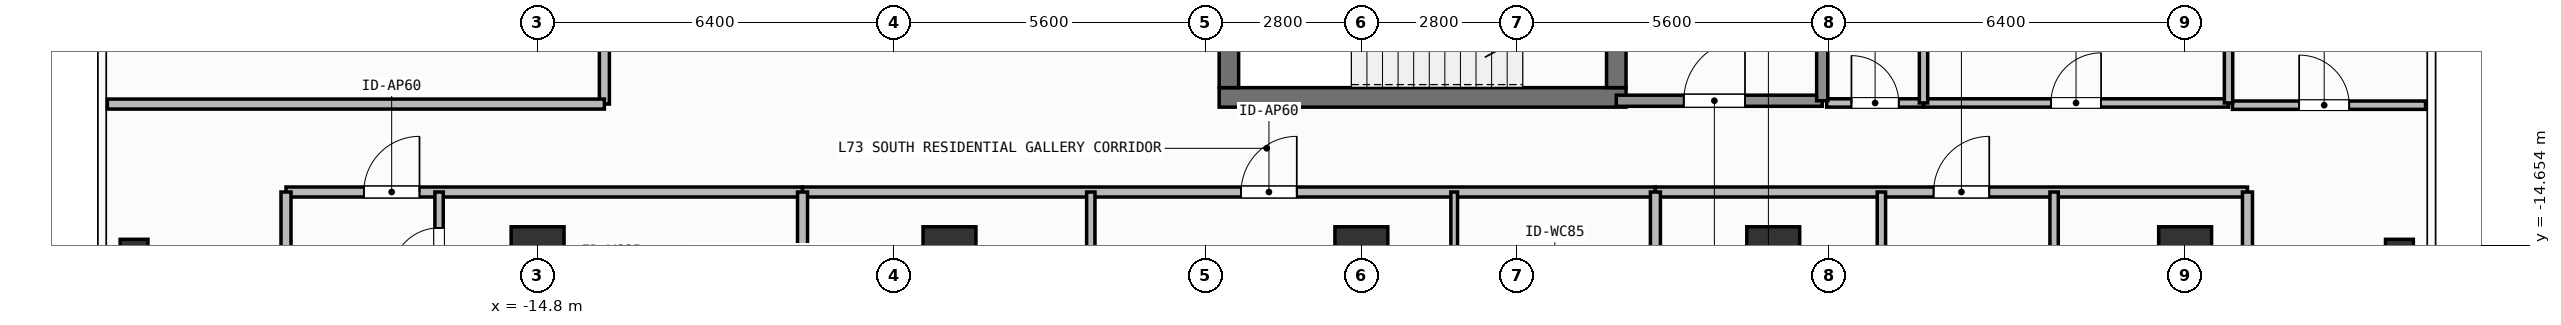
"""IFC4 building model, lengths in metres.
Left out: names, types, materials, properties, quantities, classifications, styles, units other than length and angle.
Written with IfcOpenShell. Run it as: python <this file> out.ifc"""

import sys

from ifc_helpers import new_model, si_unit, direction, frame, frame_2d, origin, origin_2d, place, context, subcontext, project, spatial, rectangle, hollow_rectangle, extrude, element, fill, save


model = new_model("IFC4")
c1 = context("Model", 3, precision=1e-05, world=origin(), true_north=direction((0.0, 1.0)))
c2 = subcontext(c1, "Body", "Model", "MODEL_VIEW")
j1 = project(units=[si_unit("LENGTHUNIT", "METRE"), si_unit("PLANEANGLEUNIT", "RADIAN")], contexts=[c1])
p1 = place(None, origin())
s1 = spatial("IfcSite", under=j1, at=p1, CompositionType="ELEMENT")
p2 = place(p1, origin())
s2 = spatial("IfcBuilding", under=s1, at=p2, CompositionType="ELEMENT")
p3 = place(p2, frame((0.0, 0.0, 297.6)))
s3 = spatial("IfcBuildingStorey", under=s2, at=p3, CompositionType="ELEMENT", Elevation=297.6)
p4 = place(p3, frame((-2.555, -12.0, 0.0), z_axis=(0.0, 0.0, 1.0), x_axis=(1.0, 0.0, 0.0)))
e1 = element("IfcWall", 1, at=p4, inside=s3, PredefinedType="SHEAR", context=c2, shape_type="SweptSolid", body=[
    extrude(rectangle(XDim=7.31, YDim=0.35, at=frame_2d((3.655, 0.0))), origin(), (0.0, 0.0, 1.0), 3.9),
])
p5 = place(p3, frame((-2.38, -11.825, 0.0), z_axis=(0.0, 0.0, 1.0), x_axis=(0.0, 1.0, 0.0)))
e2 = element("IfcWall", 2, at=p5, inside=s3, PredefinedType="SHEAR", context=c2, shape_type="SweptSolid", body=[
    extrude(rectangle(XDim=2.925, YDim=0.35, at=frame_2d((1.462, 0.0))), origin(), (0.0, 0.0, 1.0), 3.9),
])
p6 = place(p3, frame((4.58, -8.9, 0.0), z_axis=(0.0, 0.0, 1.0), x_axis=(0.0, -1.0, 0.0)))
e3 = element("IfcWall", 3, at=p6, inside=s3, PredefinedType="SHEAR", context=c2, shape_type="SweptSolid", body=[
    extrude(rectangle(XDim=2.925, YDim=0.35, at=frame_2d((1.462, 0.0))), origin(), (0.0, 0.0, 1.0), 3.9),
])
p7 = place(p6, frame((0.913, 0.0, 0.0)))
e4 = element("IfcOpeningElement", 4, at=p7, cuts=e3, PredefinedType="OPENING", context=c2, shape_type="SweptSolid", body=[
    extrude(rectangle(XDim=1.1, YDim=2.15, at=frame_2d((0.55, 1.075))), frame((0.0, 0.185, 0.0), z_axis=(0.0, -1.0, 0.0), x_axis=(1.0, 0.0, 0.0)), (0.0, 0.0, 1.0), 0.37),
])
for number, where, z_axis, x_axis in (
    (5, (-14.8, -14.8, 0.0), (0.0, 0.0, 1.0), (1.0, 0.0, 0.0)),
    (6, (-7.4, -14.8, 0.0), (0.0, 0.0, 1.0), (1.0, 0.0, 0.0)),
    (7, (0.0, -14.8, 0.0), (0.0, 0.0, 1.0), (1.0, 0.0, 0.0)),
    (8, (7.4, -14.8, 0.0), (0.0, 0.0, 1.0), (1.0, 0.0, 0.0)),
    (9, (14.8, -14.8, 0.0), (0.0, 0.0, 1.0), (1.0, 0.0, 0.0)),
):
    element("IfcColumn", number, at=place(p3, frame(where, z_axis=z_axis, x_axis=x_axis)), inside=s3, PredefinedType="COLUMN", context=c2, shape_type="SweptSolid", body=[
        extrude(rectangle(XDim=0.95, YDim=0.95, at=origin_2d()), origin(), (0.0, 0.0, 1.0), 3.9),
    ])
for number, where, z_axis, x_axis in (
    (10, (-22.05, -14.8, 0.0), (0.0, 0.0, 1.0), (1.0, 0.0, 0.0)),
    (11, (18.65, -14.8, 0.0), (0.0, 0.0, 1.0), (1.0, 0.0, 0.0)),
):
    element("IfcColumn", number, at=place(p3, frame(where, z_axis=z_axis, x_axis=x_axis)), inside=s3, PredefinedType="COLUMN", context=c2, shape_type="SweptSolid", body=[
        extrude(hollow_rectangle(XDim=0.5, YDim=0.5, WallThickness=0.025, at=origin_2d()), origin(), (0.0, 0.0, 1.0), 3.9),
    ])
p8 = place(p3, frame((4.58, -12.06, 0.0), z_axis=(0.0, 0.0, 1.0), x_axis=(1.0, 0.0, 0.0)))
e12 = element("IfcWall", 12, at=p8, inside=s3, PredefinedType="SOLIDWALL", context=c2, shape_type="SweptSolid", body=[
    extrude(rectangle(XDim=3.7, YDim=0.2, at=frame_2d((1.85, 0.0))), origin(), (0.0, 0.0, 1.0), 3.68),
])
p9 = place(p8, frame((1.212, 0.0, 0.0)))
e13 = element("IfcOpeningElement", 13, at=p9, cuts=e12, PredefinedType="OPENING", context=c2, shape_type="SweptSolid", body=[
    extrude(rectangle(XDim=1.1, YDim=2.15, at=frame_2d((0.55, 1.075))), frame((0.0, 0.11, 0.0), z_axis=(0.0, -1.0, 0.0), x_axis=(1.0, 0.0, 0.0)), (0.0, 0.0, 1.0), 0.22),
])
p10 = place(p3, frame((8.36, -12.1, 0.0), z_axis=(0.0, 0.0, 1.0), x_axis=(1.0, 0.0, 0.0)))
e14 = element("IfcWall", 14, at=p10, inside=s3, PredefinedType="PARTITIONING", context=c2, shape_type="SweptSolid", body=[
    extrude(rectangle(XDim=1.74, YDim=0.15, at=frame_2d((0.87, 0.0))), origin(), (0.0, 0.0, 1.0), 3.68),
])
p11 = place(p10, frame((0.445, 0.0, 0.0)))
e15 = element("IfcOpeningElement", 15, at=p11, cuts=e14, PredefinedType="OPENING", context=c2, shape_type="SweptSolid", body=[
    extrude(rectangle(XDim=0.85, YDim=2.1, at=frame_2d((0.425, 1.05))), frame((0.0, 0.085, 0.0), z_axis=(0.0, -1.0, 0.0), x_axis=(1.0, 0.0, 0.0)), (0.0, 0.0, 1.0), 0.17),
])
p12 = place(p3, frame((10.1, -12.1, 0.0), z_axis=(0.0, 0.0, 1.0), x_axis=(1.0, 0.0, 0.0)))
e16 = element("IfcWall", 16, at=p12, inside=s3, PredefinedType="PARTITIONING", context=c2, shape_type="SweptSolid", body=[
    extrude(rectangle(XDim=5.48, YDim=0.15, at=frame_2d((2.74, 0.0))), origin(), (0.0, 0.0, 1.0), 3.68),
])
p13 = place(p12, frame((2.29, 0.0, 0.0)))
e17 = element("IfcOpeningElement", 17, at=p13, cuts=e16, PredefinedType="OPENING", context=c2, shape_type="SweptSolid", body=[
    extrude(rectangle(XDim=0.9, YDim=2.1, at=frame_2d((0.45, 1.05))), frame((0.0, 0.085, 0.0), z_axis=(0.0, -1.0, 0.0), x_axis=(1.0, 0.0, 0.0)), (0.0, 0.0, 1.0), 0.17),
])
p14 = place(p3, frame((-19.32, -13.7, 0.0), z_axis=(0.0, 0.0, 1.0), x_axis=(1.0, 0.0, 0.0)))
e18 = element("IfcWall", 18, at=p14, inside=s3, PredefinedType="PARTITIONING", context=c2, shape_type="SweptSolid", body=[
    extrude(rectangle(XDim=9.28, YDim=0.18, at=frame_2d((4.64, 0.0))), origin(), (0.0, 0.0, 1.0), 3.68),
])
p15 = place(p14, frame((1.398, 0.0, 0.0)))
e19 = element("IfcOpeningElement", 19, at=p15, cuts=e18, PredefinedType="OPENING", context=c2, shape_type="SweptSolid", body=[
    extrude(rectangle(XDim=1.0, YDim=2.2, at=frame_2d((0.5, 1.1))), frame((0.0, 0.1, 0.0), z_axis=(0.0, -1.0, 0.0), x_axis=(1.0, 0.0, 0.0)), (0.0, 0.0, 1.0), 0.2),
])
p16 = place(p3, frame((-16.57, -15.839, 0.0), z_axis=(0.0, 0.0, 1.0), x_axis=(0.0, 1.0, 0.0)))
e20 = element("IfcWall", 20, at=p16, inside=s3, PredefinedType="PARTITIONING", context=c2, shape_type="SweptSolid", body=[
    extrude(rectangle(XDim=2.139, YDim=0.15, at=frame_2d((1.07, 0.0))), origin(), (0.0, 0.0, 1.0), 3.68),
])
p17 = place(p16, frame((0.645, 0.0, 0.0)))
e21 = element("IfcOpeningElement", 21, at=p17, cuts=e20, PredefinedType="OPENING", context=c2, shape_type="SweptSolid", body=[
    extrude(rectangle(XDim=0.85, YDim=2.1, at=frame_2d((0.425, 1.05))), frame((0.0, 0.085, 0.0), z_axis=(0.0, -1.0, 0.0), x_axis=(1.0, 0.0, 0.0)), (0.0, 0.0, 1.0), 0.17),
])
p18 = place(p3, frame((-10.04, -13.7, 0.0), z_axis=(0.0, 0.0, 1.0), x_axis=(1.0, 0.0, 0.0)))
e22 = element("IfcWall", 22, at=p18, inside=s3, PredefinedType="PARTITIONING", context=c2, shape_type="SweptSolid", body=[
    extrude(rectangle(XDim=15.323, YDim=0.18, at=frame_2d((7.662, 0.0))), origin(), (0.0, 0.0, 1.0), 3.68),
])
p19 = place(p18, frame((7.88, 0.0, 0.0)))
e23 = element("IfcOpeningElement", 23, at=p19, cuts=e22, PredefinedType="OPENING", context=c2, shape_type="SweptSolid", body=[
    extrude(rectangle(XDim=1.0, YDim=2.2, at=frame_2d((0.5, 1.1))), frame((0.0, 0.1, 0.0), z_axis=(0.0, -1.0, 0.0), x_axis=(1.0, 0.0, 0.0)), (0.0, 0.0, 1.0), 0.2),
])
p20 = place(p3, frame((-4.861, -17.59, 0.0), z_axis=(0.0, 0.0, 1.0), x_axis=(0.0, 1.0, 0.0)))
e24 = element("IfcWall", 24, at=p20, inside=s3, PredefinedType="PARTITIONING", context=c2, shape_type="SweptSolid", body=[
    extrude(rectangle(XDim=3.89, YDim=0.15, at=frame_2d((1.945, 0.0))), origin(), (0.0, 0.0, 1.0), 3.68),
])
p21 = place(p20, frame((1.52, 0.0, 0.0)))
e25 = element("IfcOpeningElement", 25, at=p21, cuts=e24, PredefinedType="OPENING", context=c2, shape_type="SweptSolid", body=[
    extrude(rectangle(XDim=0.85, YDim=2.1, at=frame_2d((0.425, 1.05))), frame((0.0, 0.085, 0.0), z_axis=(0.0, -1.0, 0.0), x_axis=(1.0, 0.0, 0.0)), (0.0, 0.0, 1.0), 0.17),
])
p22 = place(p3, frame((1.668, -15.878, 0.0), z_axis=(0.0, 0.0, 1.0), x_axis=(0.0, 1.0, 0.0)))
e26 = element("IfcWall", 26, at=p22, inside=s3, PredefinedType="PARTITIONING", context=c2, shape_type="SweptSolid", body=[
    extrude(rectangle(XDim=2.178, YDim=0.12, at=frame_2d((1.089, 0.0))), origin(), (0.0, 0.0, 1.0), 3.68),
])
p23 = place(p3, frame((5.283, -13.7, 0.0), z_axis=(0.0, 0.0, 1.0), x_axis=(1.0, 0.0, 0.0)))
e27 = element("IfcWall", 27, at=p23, inside=s3, PredefinedType="PARTITIONING", context=c2, shape_type="SweptSolid", body=[
    extrude(rectangle(XDim=10.637, YDim=0.18, at=frame_2d((5.318, 0.0))), origin(), (0.0, 0.0, 1.0), 3.68),
])
p24 = place(p23, frame((4.998, 0.0, 0.0)))
e28 = element("IfcOpeningElement", 28, at=p24, cuts=e27, PredefinedType="OPENING", context=c2, shape_type="SweptSolid", body=[
    extrude(rectangle(XDim=1.0, YDim=2.2, at=frame_2d((0.5, 1.1))), frame((0.0, 0.1, 0.0), z_axis=(0.0, -1.0, 0.0), x_axis=(1.0, 0.0, 0.0)), (0.0, 0.0, 1.0), 0.2),
])
p25 = place(p3, frame((9.343, -17.461, 0.0), z_axis=(0.0, 0.0, 1.0), x_axis=(0.0, 1.0, 0.0)))
e29 = element("IfcWall", 29, at=p25, inside=s3, PredefinedType="PARTITIONING", context=c2, shape_type="SweptSolid", body=[
    extrude(rectangle(XDim=3.761, YDim=0.15, at=frame_2d((1.88, 0.0))), origin(), (0.0, 0.0, 1.0), 3.68),
])
p26 = place(p25, frame((1.369, 0.0, 0.0)))
e30 = element("IfcOpeningElement", 30, at=p26, cuts=e29, PredefinedType="OPENING", context=c2, shape_type="SweptSolid", body=[
    extrude(rectangle(XDim=0.85, YDim=2.1, at=frame_2d((0.425, 1.05))), frame((0.0, 0.085, 0.0), z_axis=(0.0, -1.0, 0.0), x_axis=(1.0, 0.0, 0.0)), (0.0, 0.0, 1.0), 0.17),
])
p27 = place(p3, frame((12.446, -17.461, 0.0), z_axis=(0.0, 0.0, 1.0), x_axis=(0.0, 1.0, 0.0)))
e31 = element("IfcWall", 31, at=p27, inside=s3, PredefinedType="PARTITIONING", context=c2, shape_type="SweptSolid", body=[
    extrude(rectangle(XDim=3.761, YDim=0.15, at=frame_2d((1.88, 0.0))), origin(), (0.0, 0.0, 1.0), 3.68),
])
p28 = place(p27, frame((1.369, 0.0, 0.0)))
e32 = element("IfcOpeningElement", 32, at=p28, cuts=e31, PredefinedType="OPENING", context=c2, shape_type="SweptSolid", body=[
    extrude(rectangle(XDim=0.85, YDim=2.1, at=frame_2d((0.425, 1.05))), frame((0.0, 0.085, 0.0), z_axis=(0.0, -1.0, 0.0), x_axis=(1.0, 0.0, 0.0)), (0.0, 0.0, 1.0), 0.17),
])
p29 = place(p3, frame((-13.6, -12.12, 0.0), z_axis=(0.0, 0.0, 1.0), x_axis=(0.0, 1.0, 0.0)))
e33 = element("IfcWall", 33, at=p29, inside=s3, PredefinedType="PARTITIONING", context=c2, shape_type="SweptSolid", body=[
    extrude(rectangle(XDim=9.68, YDim=0.18, at=frame_2d((4.84, 0.0))), origin(), (0.0, 0.0, 1.0), 3.68),
])
p30 = place(p29, frame((3.006, 0.0, 0.0)))
e34 = element("IfcOpeningElement", 34, at=p30, cuts=e33, PredefinedType="OPENING", context=c2, shape_type="SweptSolid", body=[
    extrude(rectangle(XDim=1.0, YDim=2.2, at=frame_2d((0.5, 1.1))), frame((0.0, 0.1, 0.0), z_axis=(0.0, -1.0, 0.0), x_axis=(1.0, 0.0, 0.0)), (0.0, 0.0, 1.0), 0.2),
])
p31 = place(p3, frame((15.65, -12.14, 0.0), z_axis=(0.0, 0.0, 1.0), x_axis=(1.0, 0.0, 0.0)))
e35 = element("IfcWall", 35, at=p31, inside=s3, PredefinedType="PARTITIONING", context=c2, shape_type="SweptSolid", body=[
    extrude(rectangle(XDim=3.47, YDim=0.15, at=frame_2d((1.735, 0.0))), origin(), (0.0, 0.0, 1.0), 3.68),
])
p32 = place(p31, frame((1.198, 0.0, 0.0)))
e36 = element("IfcOpeningElement", 36, at=p32, cuts=e35, PredefinedType="OPENING", context=c2, shape_type="SweptSolid", body=[
    extrude(rectangle(XDim=0.9, YDim=2.1, at=frame_2d((0.45, 1.05))), frame((0.0, 0.085, 0.0), z_axis=(0.0, -1.0, 0.0), x_axis=(1.0, 0.0, 0.0)), (0.0, 0.0, 1.0), 0.17),
])
p33 = place(p3, frame((8.28, -12.06, 0.0), z_axis=(0.0, 0.0, 1.0), x_axis=(0.0, 1.0, 0.0)))
e37 = element("IfcWall", 37, at=p33, inside=s3, PredefinedType="SOLIDWALL", context=c2, shape_type="SweptSolid", body=[
    extrude(rectangle(XDim=3.335, YDim=0.2, at=frame_2d((1.667, 0.0))), origin(), (0.0, 0.0, 1.0), 3.68),
])
p34 = place(p3, frame((10.1, -12.1, 0.0), z_axis=(0.0, 0.0, 1.0), x_axis=(0.0, 1.0, 0.0)))
e38 = element("IfcWall", 38, at=p34, inside=s3, PredefinedType="PARTITIONING", context=c2, shape_type="SweptSolid", body=[
    extrude(rectangle(XDim=2.35, YDim=0.15, at=frame_2d((1.175, 0.0))), origin(), (0.0, 0.0, 1.0), 3.68),
])
p35 = place(p3, frame((15.58, -12.1, 0.0), z_axis=(0.0, 0.0, 1.0), x_axis=(0.0, 1.0, 0.0)))
e39 = element("IfcWall", 39, at=p35, inside=s3, PredefinedType="PARTITIONING", context=c2, shape_type="SweptSolid", body=[
    extrude(rectangle(XDim=6.25, YDim=0.15, at=frame_2d((3.125, 0.0))), origin(), (0.0, 0.0, 1.0), 3.68),
])
for number, where, z_axis, x_axis in (
    (40, (-19.32, -19.51, 0.0), (0.0, 0.0, 1.0), (0.0, 1.0, 0.0)),
    (41, (15.92, -19.51, 0.0), (0.0, 0.0, 1.0), (0.0, 1.0, 0.0)),
):
    element("IfcWall", number, at=place(p3, frame(where, z_axis=z_axis, x_axis=x_axis)), inside=s3, PredefinedType="PARTITIONING", context=c2, shape_type="SweptSolid", body=[
        extrude(rectangle(XDim=5.81, YDim=0.18, at=frame_2d((2.905, 0.0))), origin(), (0.0, 0.0, 1.0), 3.68),
    ])
for number, where, z_axis, x_axis in (
    (42, (-10.04, -20.63, 0.0), (0.0, 0.0, 1.0), (0.0, 1.0, 0.0)),
    (43, (5.283, -20.63, 0.0), (0.0, 0.0, 1.0), (0.0, 1.0, 0.0)),
):
    element("IfcWall", number, at=place(p3, frame(where, z_axis=z_axis, x_axis=x_axis)), inside=s3, PredefinedType="PARTITIONING", context=c2, shape_type="SweptSolid", body=[
        extrude(rectangle(XDim=6.93, YDim=0.18, at=frame_2d((3.465, 0.0))), origin(), (0.0, 0.0, 1.0), 3.68),
    ])
p36 = place(p3, frame((-22.53, -12.12, 0.0), z_axis=(0.0, 0.0, 1.0), x_axis=(1.0, 0.0, 0.0)))
e44 = element("IfcWall", 44, at=p36, inside=s3, PredefinedType="PARTITIONING", context=c2, shape_type="SweptSolid", body=[
    extrude(rectangle(XDim=8.93, YDim=0.18, at=frame_2d((4.465, 0.0))), origin(), (0.0, 0.0, 1.0), 3.68),
])
p37 = place(p9, origin())
e45 = element("IfcDoor", 45, at=p37, inside=s3, OperationType="SINGLE_SWING_RIGHT", PredefinedType="DOOR", context=c2, shape_type="SweptSolid", body=[
    extrude(rectangle(XDim=1.1, YDim=2.15, at=frame_2d((0.55, 1.075))), frame((0.0, 0.025, 0.0), z_axis=(0.0, -1.0, 0.0), x_axis=(1.0, 0.0, 0.0)), (0.0, 0.0, 1.0), 0.05),
])
fill(e13, e45)
p38 = place(p11, origin())
e46 = element("IfcDoor", 46, at=p38, inside=s3, OperationType="SINGLE_SWING_LEFT", PredefinedType="DOOR", context=c2, shape_type="SweptSolid", body=[
    extrude(rectangle(XDim=0.85, YDim=2.1, at=frame_2d((0.425, 1.05))), frame((0.0, 0.025, 0.0), z_axis=(0.0, -1.0, 0.0), x_axis=(1.0, 0.0, 0.0)), (0.0, 0.0, 1.0), 0.05),
])
fill(e15, e46)
p39 = place(p13, origin())
e47 = element("IfcDoor", 47, at=p39, inside=s3, OperationType="SINGLE_SWING_RIGHT", PredefinedType="DOOR", context=c2, shape_type="SweptSolid", body=[
    extrude(rectangle(XDim=0.9, YDim=2.1, at=frame_2d((0.45, 1.05))), frame((0.0, 0.025, 0.0), z_axis=(0.0, -1.0, 0.0), x_axis=(1.0, 0.0, 0.0)), (0.0, 0.0, 1.0), 0.05),
])
fill(e17, e47)
p40 = place(p15, origin())
e48 = element("IfcDoor", 48, at=p40, inside=s3, OperationType="SINGLE_SWING_RIGHT", PredefinedType="DOOR", context=c2, shape_type="SweptSolid", body=[
    extrude(rectangle(XDim=1.0, YDim=2.2, at=frame_2d((0.5, 1.1))), frame((0.0, 0.025, 0.0), z_axis=(0.0, -1.0, 0.0), x_axis=(1.0, 0.0, 0.0)), (0.0, 0.0, 1.0), 0.05),
])
fill(e19, e48)
p41 = place(p17, origin())
e49 = element("IfcDoor", 49, at=p41, inside=s3, OperationType="SINGLE_SWING_LEFT", PredefinedType="DOOR", context=c2, shape_type="SweptSolid", body=[
    extrude(rectangle(XDim=0.85, YDim=2.1, at=frame_2d((0.425, 1.05))), frame((0.0, 0.025, 0.0), z_axis=(0.0, -1.0, 0.0), x_axis=(1.0, 0.0, 0.0)), (0.0, 0.0, 1.0), 0.05),
])
fill(e21, e49)
p42 = place(p19, origin())
e50 = element("IfcDoor", 50, at=p42, inside=s3, OperationType="SINGLE_SWING_RIGHT", PredefinedType="DOOR", context=c2, shape_type="SweptSolid", body=[
    extrude(rectangle(XDim=1.0, YDim=2.2, at=frame_2d((0.5, 1.1))), frame((0.0, 0.025, 0.0), z_axis=(0.0, -1.0, 0.0), x_axis=(1.0, 0.0, 0.0)), (0.0, 0.0, 1.0), 0.05),
])
fill(e23, e50)
p43 = place(p24, origin())
e51 = element("IfcDoor", 51, at=p43, inside=s3, OperationType="SINGLE_SWING_RIGHT", PredefinedType="DOOR", context=c2, shape_type="SweptSolid", body=[
    extrude(rectangle(XDim=1.0, YDim=2.2, at=frame_2d((0.5, 1.1))), frame((0.0, 0.025, 0.0), z_axis=(0.0, -1.0, 0.0), x_axis=(1.0, 0.0, 0.0)), (0.0, 0.0, 1.0), 0.05),
])
fill(e28, e51)
p44 = place(p32, origin())
e52 = element("IfcDoor", 52, at=p44, inside=s3, OperationType="SINGLE_SWING_LEFT", PredefinedType="DOOR", context=c2, shape_type="SweptSolid", body=[
    extrude(rectangle(XDim=0.9, YDim=2.1, at=frame_2d((0.45, 1.05))), frame((0.0, 0.025, 0.0), z_axis=(0.0, -1.0, 0.0), x_axis=(1.0, 0.0, 0.0)), (0.0, 0.0, 1.0), 0.05),
])
fill(e36, e52)
save(model, sys.argv[1])
